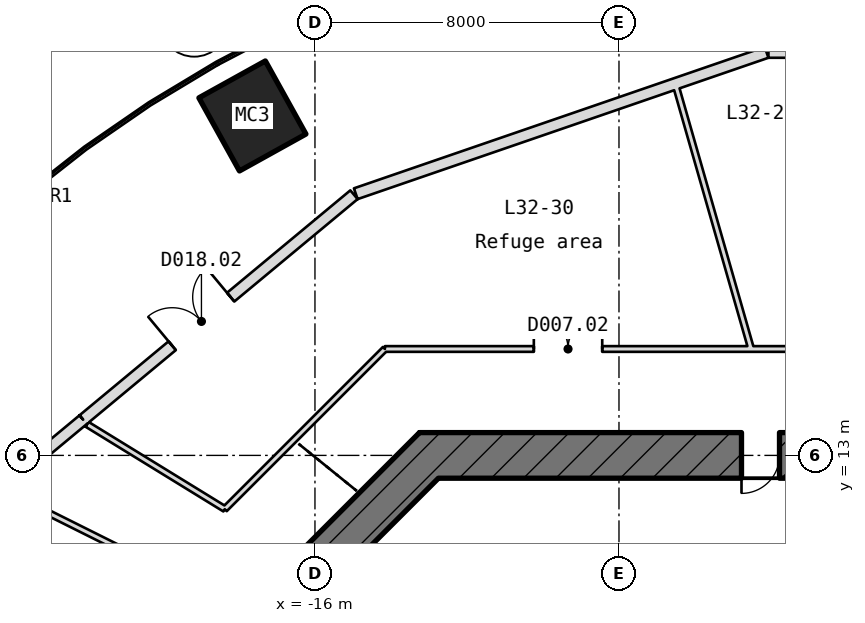
"""IFC4 building model, lengths in metres.
Left out: names, types, materials, properties, quantities, classifications, styles, units other than length and angle.
Written with IfcOpenShell. Run it as: python <this file> out.ifc"""

import sys

from ifc_helpers import new_model, si_unit, direction, frame, frame_2d, origin, place, context, subcontext, project, spatial, polyline, rectangle, outline, extrude, element, fill, save


model = new_model("IFC4")
c1 = context("Model", 3, precision=1e-05, world=origin(), true_north=direction((0.0, 1.0)))
c2 = subcontext(c1, "Body", "Model", "MODEL_VIEW")
j1 = project(units=[si_unit("LENGTHUNIT", "METRE"), si_unit("PLANEANGLEUNIT", "RADIAN")], contexts=[c1])
p1 = place(None, origin())
s1 = spatial("IfcSite", under=j1, at=p1, CompositionType="ELEMENT")
p2 = place(p1, origin())
s2 = spatial("IfcBuilding", under=s1, at=p2, CompositionType="ELEMENT")
p3 = place(p2, frame((0.0, 0.0, 149.65)))
s3 = spatial("IfcBuildingStorey", under=s2, at=p3, CompositionType="ELEMENT", Elevation=149.65)
p4 = place(p3, frame((0.0, 0.0, -0.3)))
e1 = element("IfcColumn", 1, at=p4, inside=s3, PredefinedType="COLUMN", context=c2, shape_type="SweptSolid", body=[
    extrude(outline(polyline([(-15.941, 19.581), (-17.987, 20.485), (-19.054, 22.408), (-17.305, 23.379), (-15.259, 22.475), (-14.192, 20.552), (-15.941, 19.581)])), origin(), (0.0, 0.0, 1.0), 6.05),
])
p5 = place(p3, frame((0.0, 0.0, -0.3)))
e2 = element("IfcColumn", 2, at=p5, inside=s3, PredefinedType="COLUMN", context=c2, shape_type="SweptSolid", body=[
    extrude(outline(polyline([(-24.01, 12.383), (-26.179, 13.186), (-27.893, 14.565), (-26.639, 16.123), (-24.471, 15.32), (-22.757, 13.941), (-24.01, 12.383)])), origin(), (0.0, 0.0, 1.0), 6.05),
])
p6 = place(p3, frame((13.249, 13.0, -0.3), z_axis=(0.0, 0.0, 1.0), x_axis=(-1.0, 0.0, 0.0)))
e3 = element("IfcWall", 3, at=p6, inside=s3, PredefinedType="SHEAR", context=c2, shape_type="SweptSolid", body=[
    extrude(rectangle(XDim=26.497, YDim=1.2, at=frame_2d((13.249, 0.0))), origin(), (0.0, 0.0, 1.0), 6.05),
])
p7 = place(p6, frame((17.024, 0.0, 0.3)))
e4 = element("IfcOpeningElement", 4, at=p7, cuts=e3, PredefinedType="OPENING", context=c2, shape_type="SweptSolid", body=[
    extrude(rectangle(XDim=1.0, YDim=2.1, at=frame_2d((0.5, 1.05))), frame((0.0, 0.61, 0.0), z_axis=(0.0, -1.0, 0.0), x_axis=(1.0, 0.0, 0.0)), (0.0, 0.0, 1.0), 1.22),
])
p8 = place(p6, frame((4.272, 0.0, 0.3)))
e5 = element("IfcOpeningElement", 5, at=p8, cuts=e3, PredefinedType="OPENING", context=c2, shape_type="SweptSolid", body=[
    extrude(rectangle(XDim=1.0, YDim=2.1, at=frame_2d((0.5, 1.05))), frame((0.0, 0.61, 0.0), z_axis=(0.0, -1.0, 0.0), x_axis=(1.0, 0.0, 0.0)), (0.0, 0.0, 1.0), 1.22),
])
p9 = place(p3, frame((-12.824, 13.176, -0.3), z_axis=(0.0, 0.0, 1.0), x_axis=(-0.707106781187, -0.707106781187, 0.0)))
e6 = element("IfcWall", 6, at=p9, inside=s3, PredefinedType="SHEAR", context=c2, shape_type="SweptSolid", body=[
    extrude(rectangle(XDim=4.74, YDim=1.2, at=frame_2d((2.37, 0.0))), origin(), (0.0, 0.0, 1.0), 6.05),
])
p10 = place(p3, frame((-4.067, 23.612, 0.0), z_axis=(0.0, 0.0, 1.0), x_axis=(1.0, 0.0, 0.0)))
e7 = element("IfcWall", 7, at=p10, inside=s3, PredefinedType="STANDARD", context=c2, shape_type="SweptSolid", body=[
    extrude(rectangle(XDim=11.735, YDim=0.3, at=frame_2d((5.867, 0.0))), origin(), (0.0, 0.0, 1.0), 5.75),
])
p11 = place(p3, frame((-14.926, 19.885, 0.0), z_axis=(0.0, 0.0, 1.0), x_axis=(0.945604912738, 0.325317305112, 0.0)))
e8 = element("IfcWall", 8, at=p11, inside=s3, PredefinedType="STANDARD", context=c2, shape_type="SweptSolid", body=[
    extrude(rectangle(XDim=11.432, YDim=0.3, at=frame_2d((5.716, 0.0))), origin(), (0.0, 0.0, 1.0), 5.75),
])
p12 = place(p3, frame((-22.099, 13.94, 0.0), z_axis=(0.0, 0.0, 1.0), x_axis=(0.769276667017, 0.638915807899, 0.0)))
e9 = element("IfcWall", 9, at=p12, inside=s3, PredefinedType="STANDARD", context=c2, shape_type="SweptSolid", body=[
    extrude(rectangle(XDim=9.263, YDim=0.3, at=frame_2d((4.631, 0.0))), origin(), (0.0, 0.0, 1.0), 5.75),
])
p13 = place(p12, frame((3.045, 0.0, 0.0)))
e10 = element("IfcOpeningElement", 10, at=p13, cuts=e9, PredefinedType="OPENING", context=c2, shape_type="SweptSolid", body=[
    extrude(rectangle(XDim=2.0, YDim=2.1, at=frame_2d((1.0, 1.05))), frame((0.0, 0.16, 0.0), z_axis=(0.0, -1.0, 0.0), x_axis=(1.0, 0.0, 0.0)), (0.0, 0.0, 1.0), 0.32),
])
p14 = place(p3, frame((-23.175, 13.046, 0.0), z_axis=(0.0, 0.0, 1.0), x_axis=(0.769193012161, 0.639016517816, 0.0)))
e11 = element("IfcWall", 11, at=p14, inside=s3, PredefinedType="STANDARD", context=c2, shape_type="SweptSolid", body=[
    extrude(rectangle(XDim=1.399, YDim=0.3, at=frame_2d((0.7, 0.0))), origin(), (0.0, 0.0, 1.0), 5.75),
])
p15 = place(p3, frame((-14.16, 15.8, 0.0), z_axis=(0.0, 0.0, 1.0), x_axis=(1.0, 0.0, 0.0)))
e12 = element("IfcWall", 12, at=p15, inside=s3, PredefinedType="PARTITIONING", context=c2, shape_type="SweptSolid", body=[
    extrude(rectangle(XDim=28.32, YDim=0.15, at=frame_2d((14.16, 0.0))), origin(), (0.0, 0.0, 1.0), 5.75),
])
p16 = place(p15, frame((18.453, 0.0, 0.0)))
e13 = element("IfcOpeningElement", 13, at=p16, cuts=e12, PredefinedType="OPENING", context=c2, shape_type="SweptSolid", body=[
    extrude(rectangle(XDim=1.0, YDim=2.1, at=frame_2d((0.5, 1.05))), frame((0.0, 0.085, 0.0), z_axis=(0.0, -1.0, 0.0), x_axis=(1.0, 0.0, 0.0)), (0.0, 0.0, 1.0), 0.17),
])
p17 = place(p15, frame((3.919, 0.0, 0.0)))
e14 = element("IfcOpeningElement", 14, at=p17, cuts=e12, PredefinedType="OPENING", context=c2, shape_type="SweptSolid", body=[
    extrude(rectangle(XDim=1.8, YDim=2.1, at=frame_2d((0.9, 1.05))), frame((0.0, 0.085, 0.0), z_axis=(0.0, -1.0, 0.0), x_axis=(1.0, 0.0, 0.0)), (0.0, 0.0, 1.0), 0.17),
])
p18 = place(p3, frame((-18.375, 11.585, 0.0), z_axis=(0.0, 0.0, 1.0), x_axis=(0.707106781187, 0.707106781187, 0.0)))
e15 = element("IfcWall", 15, at=p18, inside=s3, PredefinedType="PARTITIONING", context=c2, shape_type="SweptSolid", body=[
    extrude(rectangle(XDim=5.961, YDim=0.15, at=frame_2d((2.98, 0.0))), origin(), (0.0, 0.0, 1.0), 5.75),
])
p19 = place(p3, frame((-4.521, 15.8, 0.0), z_axis=(0.0, 0.0, 1.0), x_axis=(-0.275134292372, 0.961405804622, 0.0)))
e16 = element("IfcWall", 16, at=p19, inside=s3, PredefinedType="PARTITIONING", context=c2, shape_type="SweptSolid", body=[
    extrude(rectangle(XDim=7.258, YDim=0.15, at=frame_2d((3.629, 0.0))), origin(), (0.0, 0.0, 1.0), 5.75),
])
p20 = place(p3, frame((-18.371, 11.589, 0.0), z_axis=(0.0, 0.0, 1.0), x_axis=(-0.85191622945, 0.523678086233, 0.0)))
e17 = element("IfcWall", 17, at=p20, inside=s3, PredefinedType="PARTITIONING", context=c2, shape_type="SweptSolid", body=[
    extrude(rectangle(XDim=4.256, YDim=0.15, at=frame_2d((2.128, 0.0))), origin(), (0.0, 0.0, 1.0), 5.75),
])
p21 = place(p3, frame((-18.8, 9.384, 0.0), z_axis=(0.0, 0.0, 1.0), x_axis=(-0.894724139407, 0.446619205098, 0.0)))
e18 = element("IfcWall", 18, at=p21, inside=s3, PredefinedType="PARTITIONING", context=c2, shape_type="SweptSolid", body=[
    extrude(rectangle(XDim=5.423, YDim=0.15, at=frame_2d((2.711, 0.0))), origin(), (0.0, 0.0, 1.0), 5.75),
])
p22 = place(p7, origin())
e19 = element("IfcDoor", 19, at=p22, inside=s3, OperationType="SINGLE_SWING_RIGHT", PredefinedType="DOOR", context=c2, shape_type="SweptSolid", body=[
    extrude(rectangle(XDim=1.0, YDim=2.1, at=frame_2d((0.5, 1.05))), frame((0.0, 0.025, 0.0), z_axis=(0.0, -1.0, 0.0), x_axis=(1.0, 0.0, 0.0)), (0.0, 0.0, 1.0), 0.05),
])
fill(e4, e19)
p23 = place(p17, origin())
e20 = element("IfcDoor", 20, at=p23, inside=s3, OperationType="DOUBLE_DOOR_SINGLE_SWING", PredefinedType="DOOR", context=c2, shape_type="SweptSolid", body=[
    extrude(rectangle(XDim=1.8, YDim=2.1, at=frame_2d((0.9, 1.05))), frame((0.0, 0.025, 0.0), z_axis=(0.0, -1.0, 0.0), x_axis=(1.0, 0.0, 0.0)), (0.0, 0.0, 1.0), 0.05),
])
fill(e14, e20)
p24 = place(p13, origin())
e21 = element("IfcDoor", 21, at=p24, inside=s3, OperationType="DOUBLE_DOOR_SINGLE_SWING", PredefinedType="DOOR", context=c2, shape_type="SweptSolid", body=[
    extrude(rectangle(XDim=2.0, YDim=2.1, at=frame_2d((1.0, 1.05))), frame((0.0, 0.025, 0.0), z_axis=(0.0, -1.0, 0.0), x_axis=(1.0, 0.0, 0.0)), (0.0, 0.0, 1.0), 0.05),
])
fill(e10, e21)
save(model, sys.argv[1])
